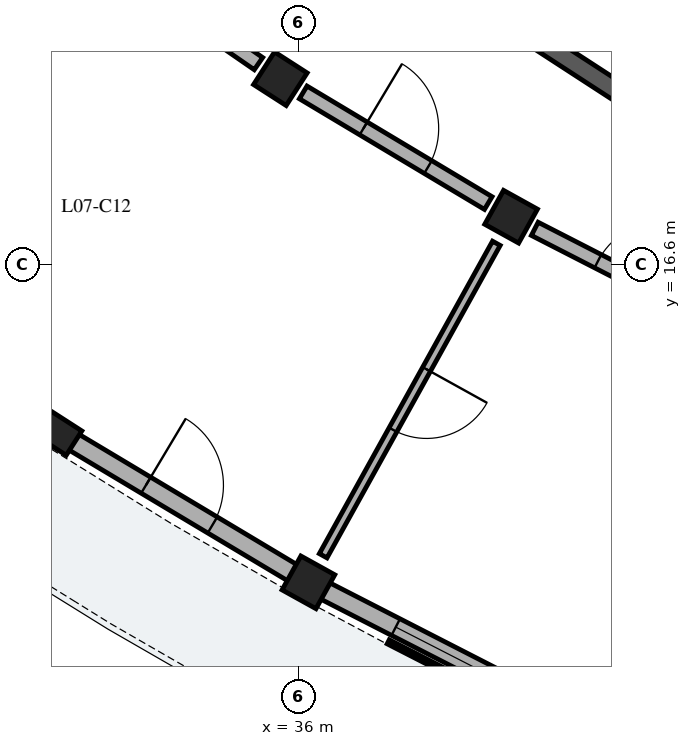
"""IFC4 building model, lengths in metres.
Left out: names, types, materials, properties, quantities, classifications, styles, units other than length and angle.
Written with IfcOpenShell. Run it as: python <this file> out.ifc"""

import sys

from ifc_helpers import new_model, si_unit, direction, frame, frame_2d, origin, origin_2d, place, context, subcontext, project, spatial, rectangle, extrude, element, fill, save


model = new_model("IFC4")
c1 = context("Model", 3, precision=1e-05, world=origin(), true_north=direction((0.0, 1.0)))
c2 = subcontext(c1, "Body", "Model", "MODEL_VIEW")
j1 = project(units=[si_unit("LENGTHUNIT", "METRE"), si_unit("PLANEANGLEUNIT", "RADIAN")], contexts=[c1])
p1 = place(None, origin())
s1 = spatial("IfcSite", under=j1, at=p1, CompositionType="ELEMENT")
p2 = place(p1, origin())
s2 = spatial("IfcBuilding", under=s1, at=p2, CompositionType="ELEMENT")
p3 = place(p2, frame((0.0, 0.0, 25.64)))
s3 = spatial("IfcBuildingStorey", under=s2, at=p3, CompositionType="ELEMENT", Elevation=25.64)
p4 = place(p3, frame((40.449, 18.709, 0.0), z_axis=(0.0, 0.0, 1.0), x_axis=(-0.838678407117, 0.544626963559, 0.0)))
e1 = element("IfcWall", 1, at=p4, inside=s3, PredefinedType="SHEAR", context=c2, shape_type="SweptSolid", body=[
    extrude(rectangle(XDim=3.42, YDim=0.25, at=frame_2d((1.71, 0.0))), origin(), (0.0, 0.0, 1.0), 3.11),
])
p5 = place(p3, frame((35.76, 19.042, 0.0), z_axis=(0.0, 0.0, 1.0), x_axis=(-0.540974471368, -0.841039012964, 0.0)))
e2 = element("IfcColumn", 2, at=p5, inside=s3, PredefinedType="COLUMN", context=c2, shape_type="SweptSolid", body=[
    extrude(rectangle(XDim=0.51, YDim=0.51, at=origin_2d()), origin(), (0.0, 0.0, 1.0), 3.11),
])
p6 = place(p3, frame((32.785, 14.416, 0.0), z_axis=(0.0, 0.0, 1.0), x_axis=(-0.540974471368, -0.841039012964, 0.0)))
e3 = element("IfcColumn", 3, at=p6, inside=s3, PredefinedType="PILASTER", context=c2, shape_type="SweptSolid", body=[
    extrude(rectangle(XDim=0.38, YDim=0.62, at=origin_2d()), origin(), (0.0, 0.0, 1.0), 3.11),
])
for number, where, z_axis, x_axis in (
    (4, (38.796, 17.227, 0.0), (0.0, 0.0, 1.0), (-0.485, -0.875, 0.0)),
    (5, (36.13, 12.417, 0.0), (0.0, 0.0, 1.0), (-0.485, -0.875, 0.0)),
):
    element("IfcColumn", number, at=place(p3, frame(where, z_axis=z_axis, x_axis=x_axis)), inside=s3, PredefinedType="COLUMN", context=c2, shape_type="SweptSolid", body=[
        extrude(rectangle(XDim=0.51, YDim=0.51, at=origin_2d()), origin(), (0.0, 0.0, 1.0), 3.11),
    ])
p7 = place(p3, frame((32.922, 14.334, 0.0), z_axis=(0.0, 0.0, 1.0), x_axis=(0.858277078874, -0.513186570245, 0.0)))
e6 = element("IfcWall", 6, at=p7, inside=s3, PredefinedType="SOLIDWALL", context=c2, shape_type="SweptSolid", body=[
    extrude(rectangle(XDim=3.512, YDim=0.245, at=frame_2d((1.756, 0.0))), origin(), (0.0, 0.0, 1.0), 2.355),
])
p8 = place(p7, frame((1.246, 0.0, 0.0)))
e7 = element("IfcOpeningElement", 7, at=p8, cuts=e6, PredefinedType="OPENING", context=c2, shape_type="SweptSolid", body=[
    extrude(rectangle(XDim=1.02, YDim=2.14, at=frame_2d((0.51, 1.07))), frame((0.0, 0.133, 0.0), z_axis=(0.0, -1.0, 0.0), x_axis=(1.0, 0.0, 0.0)), (0.0, 0.0, 1.0), 0.265),
])
p9 = place(p3, frame((36.33, 12.314, 0.0), z_axis=(0.0, 0.0, 1.0), x_axis=(0.890018595161, -0.455924226454, 0.0)))
e8 = element("IfcWall", 8, at=p9, inside=s3, PredefinedType="SOLIDWALL", context=c2, shape_type="SweptSolid", body=[
    extrude(rectangle(XDim=3.512, YDim=0.245, at=frame_2d((1.756, 0.0))), origin(), (0.0, 0.0, 1.0), 2.355),
])
p10 = place(p9, frame((1.066, 0.0, 0.55)))
e9 = element("IfcOpeningElement", 9, at=p10, cuts=e8, PredefinedType="OPENING", context=c2, shape_type="SweptSolid", body=[
    extrude(rectangle(XDim=1.38, YDim=1.56, at=frame_2d((0.69, 0.78))), frame((0.0, 0.133, 0.0), z_axis=(0.0, -1.0, 0.0), x_axis=(1.0, 0.0, 0.0)), (0.0, 0.0, 1.0), 0.265),
])
p11 = place(p3, frame((33.138, 20.853, 0.0), z_axis=(0.0, 0.0, 1.0), x_axis=(0.822870075235, -0.568229565653, 0.0)))
e10 = element("IfcWall", 10, at=p11, inside=s3, PredefinedType="PARTITIONING", context=c2, shape_type="SweptSolid", body=[
    extrude(rectangle(XDim=2.837, YDim=0.195, at=frame_2d((1.418, 0.0))), origin(), (0.0, 0.0, 1.0), 2.37),
])
p12 = place(p11, frame((0.954, 0.0, 0.0)))
e11 = element("IfcOpeningElement", 11, at=p12, cuts=e10, PredefinedType="OPENING", context=c2, shape_type="SweptSolid", body=[
    extrude(rectangle(XDim=0.93, YDim=2.12, at=frame_2d((0.465, 1.06))), frame((0.0, 0.107, 0.0), z_axis=(0.0, -1.0, 0.0), x_axis=(1.0, 0.0, 0.0)), (0.0, 0.0, 1.0), 0.215),
])
p13 = place(p3, frame((36.061, 18.862, 0.0), z_axis=(0.0, 0.0, 1.0), x_axis=(0.858281647443, -0.51317892948, 0.0)))
e12 = element("IfcWall", 12, at=p13, inside=s3, PredefinedType="PARTITIONING", context=c2, shape_type="SweptSolid", body=[
    extrude(rectangle(XDim=2.837, YDim=0.195, at=frame_2d((1.418, 0.0))), origin(), (0.0, 0.0, 1.0), 2.37),
])
p14 = place(p13, frame((0.924, 0.0, 0.0)))
e13 = element("IfcOpeningElement", 13, at=p14, cuts=e12, PredefinedType="OPENING", context=c2, shape_type="SweptSolid", body=[
    extrude(rectangle(XDim=0.99, YDim=2.16, at=frame_2d((0.495, 1.08))), frame((0.0, 0.107, 0.0), z_axis=(0.0, -1.0, 0.0), x_axis=(1.0, 0.0, 0.0)), (0.0, 0.0, 1.0), 0.215),
])
p15 = place(p3, frame((38.602, 16.877, 0.0), z_axis=(0.0, 0.0, 1.0), x_axis=(-0.484813534336, -0.874617537513, 0.0)))
e14 = element("IfcWall", 14, at=p15, inside=s3, PredefinedType="PARTITIONING", context=c2, shape_type="SweptSolid", body=[
    extrude(rectangle(XDim=4.7, YDim=0.115, at=frame_2d((2.35, 0.0))), origin(), (0.0, 0.0, 1.0), 2.37),
])
p16 = place(p15, frame((1.895, 0.0, 0.0)))
e15 = element("IfcOpeningElement", 15, at=p16, cuts=e14, PredefinedType="OPENING", context=c2, shape_type="SweptSolid", body=[
    extrude(rectangle(XDim=0.91, YDim=2.1, at=frame_2d((0.455, 1.05))), frame((0.0, 0.067, 0.0), z_axis=(0.0, -1.0, 0.0), x_axis=(1.0, 0.0, 0.0)), (0.0, 0.0, 1.0), 0.135),
])
p17 = place(p3, frame((39.107, 17.067, 0.0), z_axis=(0.0, 0.0, 1.0), x_axis=(0.890030590607, -0.45590080915, 0.0)))
e16 = element("IfcWall", 16, at=p17, inside=s3, PredefinedType="PARTITIONING", context=c2, shape_type="SweptSolid", body=[
    extrude(rectangle(XDim=2.837, YDim=0.195, at=frame_2d((1.418, 0.0))), origin(), (0.0, 0.0, 1.0), 2.37),
])
p18 = place(p17, frame((0.934, 0.0, 0.0)))
e17 = element("IfcOpeningElement", 17, at=p18, cuts=e16, PredefinedType="OPENING", context=c2, shape_type="SweptSolid", body=[
    extrude(rectangle(XDim=0.97, YDim=2.15, at=frame_2d((0.485, 1.075))), frame((0.0, 0.107, 0.0), z_axis=(0.0, -1.0, 0.0), x_axis=(1.0, 0.0, 0.0)), (0.0, 0.0, 1.0), 0.215),
])
p19 = place(p8, origin())
e18 = element("IfcDoor", 18, at=p19, inside=s3, OperationType="SINGLE_SWING_LEFT", PredefinedType="DOOR", context=c2, shape_type="SweptSolid", body=[
    extrude(rectangle(XDim=1.02, YDim=2.14, at=frame_2d((0.51, 1.07))), frame((0.0, 0.025, 0.0), z_axis=(0.0, -1.0, 0.0), x_axis=(1.0, 0.0, 0.0)), (0.0, 0.0, 1.0), 0.05),
])
fill(e7, e18)
p20 = place(p10, origin())
e19 = element("IfcWindow", 19, at=p20, inside=s3, PartitioningType="SINGLE_PANEL", PredefinedType="WINDOW", context=c2, shape_type="SweptSolid", body=[
    extrude(rectangle(XDim=1.38, YDim=1.56, at=frame_2d((0.69, 0.78))), frame((0.0, 0.03, 0.0), z_axis=(0.0, -1.0, 0.0), x_axis=(1.0, 0.0, 0.0)), (0.0, 0.0, 1.0), 0.06),
])
fill(e9, e19)
p21 = place(p14, origin())
e20 = element("IfcDoor", 20, at=p21, inside=s3, OperationType="SINGLE_SWING_LEFT", PredefinedType="DOOR", context=c2, shape_type="SweptSolid", body=[
    extrude(rectangle(XDim=0.99, YDim=2.16, at=frame_2d((0.495, 1.08))), frame((0.0, 0.025, 0.0), z_axis=(0.0, -1.0, 0.0), x_axis=(1.0, 0.0, 0.0)), (0.0, 0.0, 1.0), 0.05),
])
fill(e13, e20)
p22 = place(p16, origin())
e21 = element("IfcDoor", 21, at=p22, inside=s3, OperationType="SINGLE_SWING_LEFT", PredefinedType="DOOR", context=c2, shape_type="SweptSolid", body=[
    extrude(rectangle(XDim=0.91, YDim=2.1, at=frame_2d((0.455, 1.05))), frame((0.0, 0.025, 0.0), z_axis=(0.0, -1.0, 0.0), x_axis=(1.0, 0.0, 0.0)), (0.0, 0.0, 1.0), 0.05),
])
fill(e15, e21)
p23 = place(p18, origin())
e22 = element("IfcDoor", 22, at=p23, inside=s3, OperationType="SINGLE_SWING_RIGHT", PredefinedType="DOOR", context=c2, shape_type="SweptSolid", body=[
    extrude(rectangle(XDim=0.97, YDim=2.15, at=frame_2d((0.485, 1.075))), frame((0.0, 0.025, 0.0), z_axis=(0.0, -1.0, 0.0), x_axis=(1.0, 0.0, 0.0)), (0.0, 0.0, 1.0), 0.05),
])
fill(e17, e22)
save(model, sys.argv[1])
